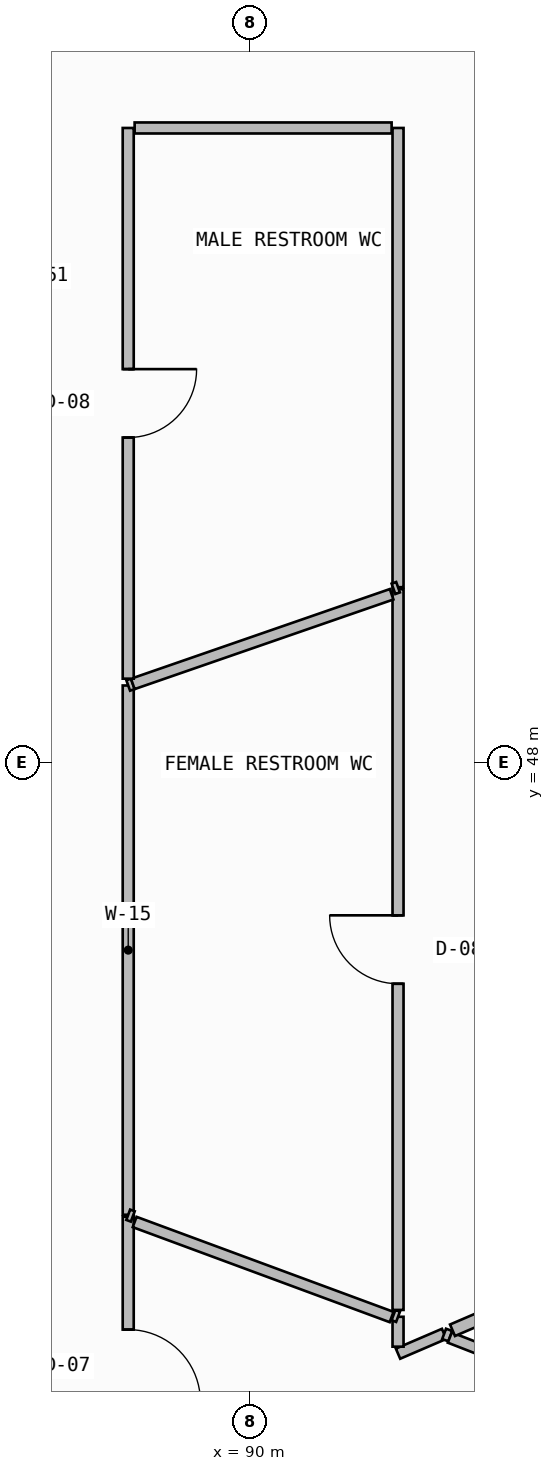
"""IFC4 building model, lengths in metres.
Left out: names, types, materials, properties, quantities, classifications, styles, units other than length and angle.
Written with IfcOpenShell. Run it as: python <this file> out.ifc"""

import sys

from ifc_helpers import new_model, si_unit, direction, frame, frame_2d, origin, place, context, subcontext, project, spatial, rectangle, extrude, element, fill, save


model = new_model("IFC4")
c1 = context("Model", 3, precision=1e-05, world=origin(), true_north=direction((0.0, 1.0)))
c2 = subcontext(c1, "Body", "Model", "MODEL_VIEW")
j1 = project(units=[si_unit("LENGTHUNIT", "METRE"), si_unit("PLANEANGLEUNIT", "RADIAN")], contexts=[c1])
p1 = place(None, origin())
s1 = spatial("IfcSite", under=j1, at=p1, CompositionType="ELEMENT")
p2 = place(p1, origin())
s2 = spatial("IfcBuilding", under=s1, at=p2, CompositionType="ELEMENT")
p3 = place(p2, frame((0.0, 0.0, 182.62)))
s3 = spatial("IfcBuildingStorey", under=s2, at=p3, CompositionType="ELEMENT", Elevation=182.62)
p4 = place(p3, frame((86.1, 36.296, 0.0), z_axis=(0.0, 0.0, 1.0), x_axis=(0.918792412723, 0.394741057306, 0.0)))
e1 = element("IfcWall", 1, at=p4, inside=s3, PredefinedType="SOLIDWALL", context=c2, shape_type="SweptSolid", body=[
    extrude(rectangle(XDim=11.794, YDim=0.42, at=frame_2d((5.897, 0.0))), origin(), (0.0, 0.0, 1.0), 2.245),
])
p5 = place(p4, frame((4.911, 0.0, 1.2)))
e2 = element("IfcOpeningElement", 2, at=p5, cuts=e1, PredefinedType="OPENING", context=c2, shape_type="SweptSolid", body=[
    extrude(rectangle(XDim=2.4, YDim=0.9, at=frame_2d((1.2, 0.45))), frame((0.0, 0.22, 0.0), z_axis=(0.0, -1.0, 0.0), x_axis=(1.0, 0.0, 0.0)), (0.0, 0.0, 1.0), 0.44),
])
p6 = place(p3, frame((117.363, 52.344, 0.0), z_axis=(0.0, 0.0, 1.0), x_axis=(-0.94800468727, 0.31825636351, 0.0)))
e3 = element("IfcWall", 3, at=p6, inside=s3, PredefinedType="PARAPET", context=c2, shape_type="SweptSolid", body=[
    extrude(rectangle(XDim=31.869, YDim=0.2, at=frame_2d((15.935, 0.0))), origin(), (0.0, 0.0, 1.0), 1.15),
])
p7 = place(p3, frame((88.4, 38.699, 0.0), z_axis=(0.0, 0.0, 1.0), x_axis=(0.0, 1.0, 0.0)))
e4 = element("IfcWall", 4, at=p7, inside=s3, PredefinedType="PARTITIONING", context=c2, shape_type="SweptSolid", body=[
    extrude(rectangle(XDim=3.327, YDim=0.145, at=frame_2d((1.664, 0.0))), origin(), (0.0, 0.0, 1.0), 3.26),
])
p8 = place(p7, frame((0.892, 0.0, 0.0)))
e5 = element("IfcOpeningElement", 5, at=p8, cuts=e4, PredefinedType="OPENING", context=c2, shape_type="SweptSolid", body=[
    extrude(rectangle(XDim=0.95, YDim=2.15, at=frame_2d((0.475, 1.075))), frame((0.0, 0.083, 0.0), z_axis=(0.0, -1.0, 0.0), x_axis=(1.0, 0.0, 0.0)), (0.0, 0.0, 1.0), 0.165),
])
p9 = place(p3, frame((91.95, 40.225, 0.0), z_axis=(0.0, 0.0, 1.0), x_axis=(0.918761815861, 0.394812266421, 0.0)))
e6 = element("IfcWall", 6, at=p9, inside=s3, PredefinedType="PARTITIONING", context=c2, shape_type="SweptSolid", body=[
    extrude(rectangle(XDim=0.66, YDim=0.145, at=frame_2d((0.33, 0.0))), origin(), (0.0, 0.0, 1.0), 3.26),
])
p10 = place(p3, frame((91.95, 40.71, 0.0), z_axis=(0.0, 0.0, 1.0), x_axis=(0.0, -1.0, 0.0)))
e7 = element("IfcWall", 7, at=p10, inside=s3, PredefinedType="PARTITIONING", context=c2, shape_type="SweptSolid", body=[
    extrude(rectangle(XDim=0.393, YDim=0.145, at=frame_2d((0.197, 0.0))), origin(), (0.0, 0.0, 1.0), 3.26),
])
p11 = place(p3, frame((92.556, 40.485, 0.0), z_axis=(0.0, 0.0, 1.0), x_axis=(0.936559447389, -0.35050877522, 0.0)))
e8 = element("IfcWall", 8, at=p11, inside=s3, PredefinedType="PARTITIONING", context=c2, shape_type="SweptSolid", body=[
    extrude(rectangle(XDim=0.087, YDim=0.145, at=frame_2d((0.043, 0.0))), origin(), (0.0, 0.0, 1.0), 3.26),
])
p12 = place(p3, frame((91.89, 40.732, 0.0), z_axis=(0.0, 0.0, 1.0), x_axis=(0.9366417498, -0.350288784478, 0.0)))
e9 = element("IfcWall", 9, at=p12, inside=s3, PredefinedType="PARTITIONING", context=c2, shape_type="SweptSolid", body=[
    extrude(rectangle(XDim=0.064, YDim=0.145, at=frame_2d((0.032, 0.0))), origin(), (0.0, 0.0, 1.0), 3.26),
])
p13 = place(p3, frame((88.485, 41.957, 0.0), z_axis=(0.0, 0.0, 1.0), x_axis=(0.937944697407, -0.346784867903, 0.0)))
e10 = element("IfcWall", 10, at=p13, inside=s3, PredefinedType="PARTITIONING", context=c2, shape_type="SweptSolid", body=[
    extrude(rectangle(XDim=3.604, YDim=0.145, at=frame_2d((1.802, 0.0))), origin(), (0.0, 0.0, 1.0), 3.26),
])
p14 = place(p3, frame((92.631, 40.437, 0.0), z_axis=(0.0, 0.0, 1.0), x_axis=(0.931460804404, -0.363841682411, 0.0)))
e11 = element("IfcWall", 11, at=p14, inside=s3, PredefinedType="PARTITIONING", context=c2, shape_type="SweptSolid", body=[
    extrude(rectangle(XDim=2.245, YDim=0.145, at=frame_2d((1.123, 0.0))), origin(), (0.0, 0.0, 1.0), 3.26),
])
p15 = place(p3, frame((91.95, 50.283, 0.0), z_axis=(0.0, 0.0, 1.0), x_axis=(0.0, -1.0, 0.0)))
e12 = element("IfcWall", 12, at=p15, inside=s3, PredefinedType="PARTITIONING", context=c2, shape_type="SweptSolid", body=[
    extrude(rectangle(XDim=9.483, YDim=0.145, at=frame_2d((4.741, 0.0))), origin(), (0.0, 0.0, 1.0), 2.745),
])
p16 = place(p15, frame((4.292, 0.0, 0.0)))
e13 = element("IfcOpeningElement", 13, at=p16, cuts=e12, PredefinedType="OPENING", context=c2, shape_type="SweptSolid", body=[
    extrude(rectangle(XDim=0.9, YDim=2.1, at=frame_2d((0.45, 1.05))), frame((0.0, 0.083, 0.0), z_axis=(0.0, -1.0, 0.0), x_axis=(1.0, 0.0, 0.0)), (0.0, 0.0, 1.0), 0.165),
])
p17 = place(p3, frame((88.4, 42.052, 0.0), z_axis=(0.0, 0.0, 1.0), x_axis=(0.0, 1.0, 0.0)))
e14 = element("IfcWall", 14, at=p17, inside=s3, PredefinedType="PARTITIONING", context=c2, shape_type="SweptSolid", body=[
    extrude(rectangle(XDim=6.963, YDim=0.145, at=frame_2d((3.481, 0.0))), origin(), (0.0, 0.0, 1.0), 2.745),
])
p18 = place(p3, frame((88.46, 42.03, 0.0), z_axis=(0.0, 0.0, 1.0), x_axis=(-0.937886655879, 0.346941811727, 0.0)))
e15 = element("IfcWall", 15, at=p18, inside=s3, PredefinedType="PARTITIONING", context=c2, shape_type="SweptSolid", body=[
    extrude(rectangle(XDim=0.064, YDim=0.145, at=frame_2d((0.032, 0.0))), origin(), (0.0, 0.0, 1.0), 3.26),
])
p19 = place(p3, frame((88.4, 49.015, 0.0), z_axis=(0.0, 0.0, 1.0), x_axis=(0.941568596034, 0.336821286386, 0.0)))
e16 = element("IfcWall", 16, at=p19, inside=s3, PredefinedType="PARTITIONING", context=c2, shape_type="SweptSolid", body=[
    extrude(rectangle(XDim=0.064, YDim=0.145, at=frame_2d((0.032, 0.0))), origin(), (0.0, 0.0, 1.0), 3.26),
])
p20 = place(p3, frame((88.46, 49.036, 0.0), z_axis=(0.0, 0.0, 1.0), x_axis=(0.944947404907, 0.327222251627, 0.0)))
e17 = element("IfcWall", 17, at=p20, inside=s3, PredefinedType="PARTITIONING", context=c2, shape_type="SweptSolid", body=[
    extrude(rectangle(XDim=3.604, YDim=0.145, at=frame_2d((1.802, 0.0))), origin(), (0.0, 0.0, 1.0), 3.26),
])
p21 = place(p3, frame((92.667, 40.532, 0.0), z_axis=(0.0, 0.0, 1.0), x_axis=(0.918809189305, 0.394702006136, 0.0)))
e18 = element("IfcWall", 18, at=p21, inside=s3, PredefinedType="PARTITIONING", context=c2, shape_type="SweptSolid", body=[
    extrude(rectangle(XDim=1.506, YDim=0.165, at=frame_2d((0.753, 0.0))), origin(), (0.0, 0.0, 1.0), 3.26),
])
p22 = place(p3, frame((88.4, 49.105, 0.0), z_axis=(0.0, 0.0, 1.0), x_axis=(0.0, 1.0, 0.0)))
e19 = element("IfcWall", 19, at=p22, inside=s3, PredefinedType="PARTITIONING", context=c2, shape_type="SweptSolid", body=[
    extrude(rectangle(XDim=7.245, YDim=0.145, at=frame_2d((3.623, 0.0))), origin(), (0.0, 0.0, 1.0), 2.745),
])
p23 = place(p22, frame((3.173, 0.0, 0.0)))
e20 = element("IfcOpeningElement", 20, at=p23, cuts=e19, PredefinedType="OPENING", context=c2, shape_type="SweptSolid", body=[
    extrude(rectangle(XDim=0.9, YDim=2.1, at=frame_2d((0.45, 1.05))), frame((0.0, 0.083, 0.0), z_axis=(0.0, -1.0, 0.0), x_axis=(1.0, 0.0, 0.0)), (0.0, 0.0, 1.0), 0.165),
])
p24 = place(p3, frame((91.95, 56.35, 0.0), z_axis=(0.0, 0.0, 1.0), x_axis=(0.0, -1.0, 0.0)))
e21 = element("IfcWall", 21, at=p24, inside=s3, PredefinedType="PARTITIONING", context=c2, shape_type="SweptSolid", body=[
    extrude(rectangle(XDim=6.042, YDim=0.145, at=frame_2d((3.021, 0.0))), origin(), (0.0, 0.0, 1.0), 2.745),
])
p25 = place(p3, frame((88.485, 56.35, 0.0), z_axis=(0.0, 0.0, 1.0), x_axis=(1.0, 0.0, 0.0)))
e22 = element("IfcWall", 22, at=p25, inside=s3, PredefinedType="PARTITIONING", context=c2, shape_type="SweptSolid", body=[
    extrude(rectangle(XDim=3.381, YDim=0.145, at=frame_2d((1.69, 0.0))), origin(), (0.0, 0.0, 1.0), 2.745),
])
p26 = place(p3, frame((91.95, 50.308, 0.0), z_axis=(0.0, 0.0, 1.0), x_axis=(-0.942777884126, -0.333421446825, 0.0)))
e23 = element("IfcWall", 23, at=p26, inside=s3, PredefinedType="PARTITIONING", context=c2, shape_type="SweptSolid", body=[
    extrude(rectangle(XDim=0.064, YDim=0.145, at=frame_2d((0.032, 0.0))), origin(), (0.0, 0.0, 1.0), 3.26),
])
p27 = place(p8, frame((0.95, 0.0, 0.0), z_axis=(0.0, 0.0, 1.0), x_axis=(-1.0, 0.0, 0.0)))
e24 = element("IfcDoor", 24, at=p27, inside=s3, OperationType="SINGLE_SWING_RIGHT", PredefinedType="DOOR", context=c2, shape_type="SweptSolid", body=[
    extrude(rectangle(XDim=0.95, YDim=2.15, at=frame_2d((0.475, 1.075))), frame((0.0, 0.025, 0.0), z_axis=(0.0, -1.0, 0.0), x_axis=(1.0, 0.0, 0.0)), (0.0, 0.0, 1.0), 0.05),
])
fill(e5, e24)
p28 = place(p16, frame((0.9, 0.0, 0.0), z_axis=(0.0, 0.0, 1.0), x_axis=(-1.0, 0.0, 0.0)))
e25 = element("IfcDoor", 25, at=p28, inside=s3, OperationType="SINGLE_SWING_RIGHT", PredefinedType="DOOR", context=c2, shape_type="SweptSolid", body=[
    extrude(rectangle(XDim=0.9, YDim=2.1, at=frame_2d((0.45, 1.05))), frame((0.0, 0.025, 0.0), z_axis=(0.0, -1.0, 0.0), x_axis=(1.0, 0.0, 0.0)), (0.0, 0.0, 1.0), 0.05),
])
fill(e13, e25)
p29 = place(p23, frame((0.9, 0.0, 0.0), z_axis=(0.0, 0.0, 1.0), x_axis=(-1.0, 0.0, 0.0)))
e26 = element("IfcDoor", 26, at=p29, inside=s3, OperationType="SINGLE_SWING_LEFT", PredefinedType="DOOR", context=c2, shape_type="SweptSolid", body=[
    extrude(rectangle(XDim=0.9, YDim=2.1, at=frame_2d((0.45, 1.05))), frame((0.0, 0.025, 0.0), z_axis=(0.0, -1.0, 0.0), x_axis=(1.0, 0.0, 0.0)), (0.0, 0.0, 1.0), 0.05),
])
fill(e20, e26)
save(model, sys.argv[1])
